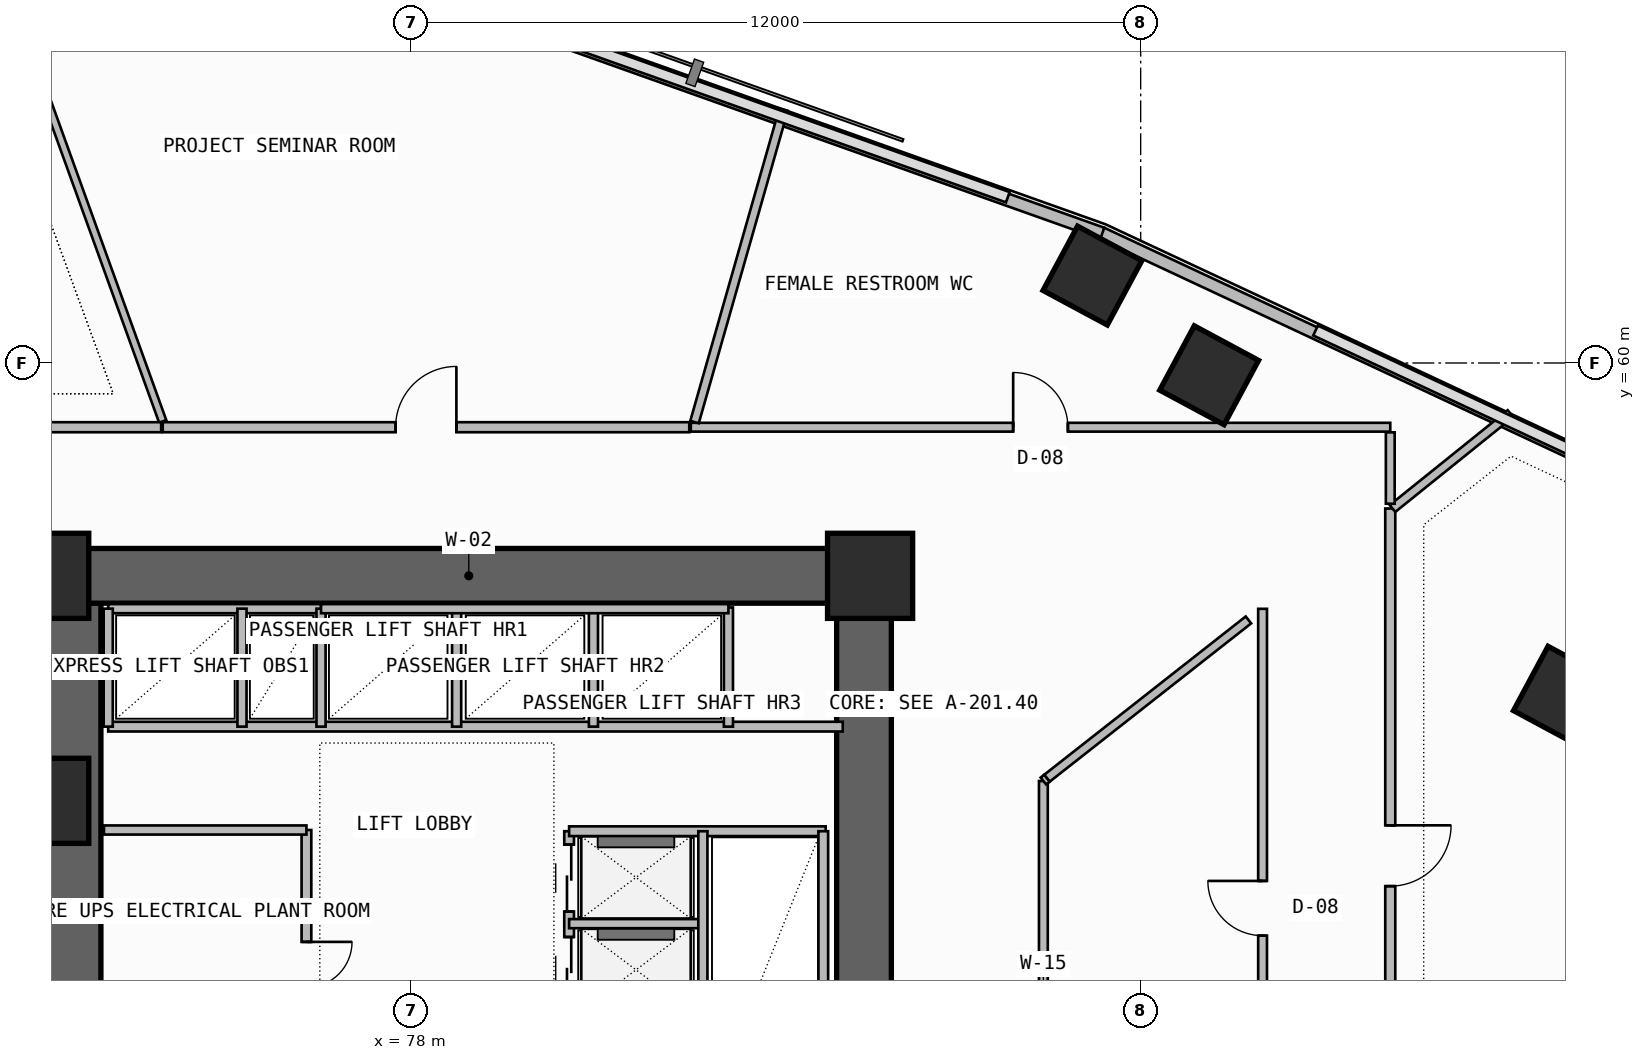
"""IFC4 building model, lengths in metres.
Left out: names, types, materials, properties, quantities, classifications, styles, units other than length and angle.
Written with IfcOpenShell. Run it as: python <this file> out.ifc"""

import sys

from ifc_helpers import new_model, si_unit, direction, frame, frame_2d, origin, origin_2d, place, context, subcontext, project, spatial, rectangle, extrude, element, fill, save


model = new_model("IFC4")
c1 = context("Model", 3, precision=1e-05, world=origin(), true_north=direction((0.0, 1.0)))
c2 = subcontext(c1, "Body", "Model", "MODEL_VIEW")
j1 = project(units=[si_unit("LENGTHUNIT", "METRE"), si_unit("PLANEANGLEUNIT", "RADIAN")], contexts=[c1])
p1 = place(None, origin())
s1 = spatial("IfcSite", under=j1, at=p1, CompositionType="ELEMENT")
p2 = place(p1, origin())
s2 = spatial("IfcBuilding", under=s1, at=p2, CompositionType="ELEMENT")
p3 = place(p2, frame((0.0, 0.0, 143.1)))
s3 = spatial("IfcBuildingStorey", under=s2, at=p3, CompositionType="ELEMENT", Elevation=143.1)
p4 = place(p3, frame((72.45, 43.35, -0.26), z_axis=(0.0, 0.0, 1.0), x_axis=(0.0, 1.0, 0.0)))
e1 = element("IfcWall", 1, at=p4, inside=s3, PredefinedType="SHEAR", context=c2, shape_type="SweptSolid", body=[
    extrude(rectangle(XDim=12.7, YDim=0.9, at=frame_2d((6.35, 0.0))), origin(), (0.0, 0.0, 1.0), 3.6),
])
p5 = place(p4, frame((1.35, 0.0, 0.26)))
e2 = element("IfcOpeningElement", 2, at=p5, cuts=e1, PredefinedType="OPENING", context=c2, shape_type="SweptSolid", body=[
    extrude(rectangle(XDim=1.2, YDim=2.2, at=frame_2d((0.6, 1.1))), frame((0.0, 0.46, 0.0), z_axis=(0.0, -1.0, 0.0), x_axis=(1.0, 0.0, 0.0)), (0.0, 0.0, 1.0), 0.92),
])
p6 = place(p3, frame((72.0, 56.5, -0.26), z_axis=(0.0, 0.0, 1.0), x_axis=(1.0, 0.0, 0.0)))
e3 = element("IfcWall", 3, at=p6, inside=s3, PredefinedType="SHEAR", context=c2, shape_type="SweptSolid", body=[
    extrude(rectangle(XDim=13.9, YDim=0.9, at=frame_2d((6.95, 0.0))), origin(), (0.0, 0.0, 1.0), 3.6),
])
p7 = place(p3, frame((85.45, 47.6, -0.26), z_axis=(0.0, 0.0, 1.0), x_axis=(0.0, 1.0, 0.0)))
e4 = element("IfcWall", 4, at=p7, inside=s3, PredefinedType="SHEAR", context=c2, shape_type="SweptSolid", body=[
    extrude(rectangle(XDim=8.45, YDim=0.9, at=frame_2d((4.225, 0.0))), origin(), (0.0, 0.0, 1.0), 3.6),
])
for number, where, z_axis, x_axis in (
    (5, (72.0, 52.8, 0.0), (0.0, 0.0, 1.0), (1.0, 0.0, 0.0)),
    (6, (72.0, 56.5, 0.0), (0.0, 0.0, 1.0), (1.0, 0.0, 0.0)),
    (7, (85.55, 56.5, 0.0), (0.0, 0.0, 1.0), (1.0, 0.0, 0.0)),
):
    element("IfcColumn", number, at=place(p3, frame(where, z_axis=z_axis, x_axis=x_axis)), inside=s3, PredefinedType="COLUMN", context=c2, shape_type="SweptSolid", body=[
        extrude(rectangle(XDim=1.4, YDim=1.4, at=origin_2d()), origin(), (0.0, 0.0, 1.0), 3.6),
    ])
for number, where, z_axis, x_axis in (
    (8, (96.944, 54.528, 0.0), (0.0, 0.0, 1.0), (0.473, 0.881, 0.0)),
    (9, (91.126, 59.798, 0.0), (0.0, 0.0, 1.0), (0.473, 0.881, 0.0)),
    (10, (89.207, 61.438, 0.0), (0.0, 0.0, 1.0), (0.473, 0.881, 0.0)),
):
    element("IfcColumn", number, at=place(p3, frame(where, z_axis=z_axis, x_axis=x_axis)), inside=s3, PredefinedType="COLUMN", context=c2, shape_type="SweptSolid", body=[
        extrude(rectangle(XDim=1.2, YDim=1.2, at=origin_2d()), origin(), (0.0, 0.0, 1.0), 3.6),
    ])
p8 = place(p3, frame((119.926, 47.843, 0.0), z_axis=(0.0, 0.0, 1.0), x_axis=(-0.905880730846, 0.423532881228, 0.0)))
e11 = element("IfcWall", 11, at=p8, inside=s3, PredefinedType="PARAPET", context=c2, shape_type="SweptSolid", body=[
    extrude(rectangle(XDim=33.748, YDim=0.2, at=frame_2d((16.874, 0.0))), origin(), (0.0, 0.0, 1.0), 1.15),
])
p9 = place(p3, frame((89.368, 62.13, 0.0), z_axis=(0.0, 0.0, 1.0), x_axis=(-0.942033439765, 0.335518998515, 0.0)))
e12 = element("IfcWall", 12, at=p9, inside=s3, PredefinedType="PARAPET", context=c2, shape_type="SweptSolid", body=[
    extrude(rectangle(XDim=27.969, YDim=0.2, at=frame_2d((13.985, 0.0))), origin(), (0.0, 0.0, 1.0), 1.15),
])
p10 = place(p3, frame((76.28, 47.18, 0.0), z_axis=(0.0, 0.0, 1.0), x_axis=(0.0, 1.0, 0.0)))
e13 = element("IfcWall", 13, at=p10, inside=s3, PredefinedType="SOLIDWALL", context=c2, shape_type="SweptSolid", body=[
    extrude(rectangle(XDim=5.14, YDim=0.16, at=frame_2d((2.57, 0.0))), origin(), (0.0, 0.0, 1.0), 3.34),
])
p11 = place(p10, frame((1.8, 0.0, 0.0)))
e14 = element("IfcOpeningElement", 14, at=p11, cuts=e13, PredefinedType="OPENING", context=c2, shape_type="SweptSolid", body=[
    extrude(rectangle(XDim=1.5, YDim=2.25, at=frame_2d((0.75, 1.125))), frame((0.0, 0.09, 0.0), z_axis=(0.0, -1.0, 0.0), x_axis=(1.0, 0.0, 0.0)), (0.0, 0.0, 1.0), 0.18),
])
p12 = place(p3, frame((72.95, 52.32, 0.0), z_axis=(0.0, 0.0, 1.0), x_axis=(1.0, 0.0, 0.0)))
e15 = element("IfcWall", 15, at=p12, inside=s3, PredefinedType="SOLIDWALL", context=c2, shape_type="SweptSolid", body=[
    extrude(rectangle(XDim=3.33, YDim=0.15, at=frame_2d((1.665, 0.0))), origin(), (0.0, 0.0, 1.0), 3.34),
])
p13 = place(p3, frame((80.6, 47.7, 0.0), z_axis=(0.0, 0.0, 1.0), x_axis=(0.0, 1.0, 0.0)))
e16 = element("IfcWall", 16, at=p13, inside=s3, PredefinedType="SOLIDWALL", context=c2, shape_type="SweptSolid", body=[
    extrude(rectangle(XDim=4.6, YDim=0.16, at=frame_2d((2.3, 0.0))), origin(), (0.0, 0.0, 1.0), 3.34),
])
p14 = place(p13, frame((0.24, 0.0, 0.0)))
e17 = element("IfcOpeningElement", 17, at=p14, cuts=e16, PredefinedType="OPENING", context=c2, shape_type="SweptSolid", body=[
    extrude(rectangle(XDim=1.1, YDim=2.25, at=frame_2d((0.55, 1.125))), frame((0.0, 0.09, 0.0), z_axis=(0.0, -1.0, 0.0), x_axis=(1.0, 0.0, 0.0)), (0.0, 0.0, 1.0), 0.18),
])
p15 = place(p13, frame((1.76, 0.0, 0.0)))
e18 = element("IfcOpeningElement", 18, at=p15, cuts=e16, PredefinedType="OPENING", context=c2, shape_type="SweptSolid", body=[
    extrude(rectangle(XDim=1.1, YDim=2.25, at=frame_2d((0.55, 1.125))), frame((0.0, 0.09, 0.0), z_axis=(0.0, -1.0, 0.0), x_axis=(1.0, 0.0, 0.0)), (0.0, 0.0, 1.0), 0.18),
])
p16 = place(p13, frame((3.28, 0.0, 0.0)))
e19 = element("IfcOpeningElement", 19, at=p16, cuts=e16, PredefinedType="OPENING", context=c2, shape_type="SweptSolid", body=[
    extrude(rectangle(XDim=1.1, YDim=2.25, at=frame_2d((0.55, 1.125))), frame((0.0, 0.09, 0.0), z_axis=(0.0, -1.0, 0.0), x_axis=(1.0, 0.0, 0.0)), (0.0, 0.0, 1.0), 0.18),
])
p17 = place(p3, frame((80.6, 52.3, 0.0), z_axis=(0.0, 0.0, 1.0), x_axis=(1.0, 0.0, 0.0)))
e20 = element("IfcWall", 20, at=p17, inside=s3, PredefinedType="SOLIDWALL", context=c2, shape_type="SweptSolid", body=[
    extrude(rectangle(XDim=4.22, YDim=0.16, at=frame_2d((2.11, 0.0))), origin(), (0.0, 0.0, 1.0), 3.34),
])
p18 = place(p3, frame((80.6, 50.78, 0.0), z_axis=(0.0, 0.0, 1.0), x_axis=(1.0, 0.0, 0.0)))
e21 = element("IfcWall", 21, at=p18, inside=s3, PredefinedType="PLUMBINGWALL", context=c2, shape_type="SweptSolid", body=[
    extrude(rectangle(XDim=2.2, YDim=0.15, at=frame_2d((1.1, 0.0))), origin(), (0.0, 0.0, 1.0), 3.34),
])
p19 = place(p3, frame((82.8, 47.7, 0.0), z_axis=(0.0, 0.0, 1.0), x_axis=(0.0, 1.0, 0.0)))
e22 = element("IfcWall", 22, at=p19, inside=s3, PredefinedType="PLUMBINGWALL", context=c2, shape_type="SweptSolid", body=[
    extrude(rectangle(XDim=4.6, YDim=0.15, at=frame_2d((2.3, 0.0))), origin(), (0.0, 0.0, 1.0), 3.34),
])
p20 = place(p3, frame((84.78, 47.7, 0.0), z_axis=(0.0, 0.0, 1.0), x_axis=(0.0, 1.0, 0.0)))
e23 = element("IfcWall", 23, at=p20, inside=s3, PredefinedType="SOLIDWALL", context=c2, shape_type="SweptSolid", body=[
    extrude(rectangle(XDim=4.6, YDim=0.16, at=frame_2d((2.3, 0.0))), origin(), (0.0, 0.0, 1.0), 3.34),
])
p21 = place(p3, frame((73.02, 54.02, 0.0), z_axis=(0.0, 0.0, 1.0), x_axis=(1.0, 0.0, 0.0)))
e24 = element("IfcWall", 24, at=p21, inside=s3, PredefinedType="SOLIDWALL", context=c2, shape_type="SweptSolid", body=[
    extrude(rectangle(XDim=12.08, YDim=0.16, at=frame_2d((6.04, 0.0))), origin(), (0.0, 0.0, 1.0), 3.34),
])
p22 = place(p3, frame((73.02, 55.96, 0.0), z_axis=(0.0, 0.0, 1.0), x_axis=(1.0, 0.0, 0.0)))
e25 = element("IfcWall", 25, at=p22, inside=s3, PredefinedType="SOLIDWALL", context=c2, shape_type="SweptSolid", body=[
    extrude(rectangle(XDim=3.5, YDim=0.15, at=frame_2d((1.75, 0.0))), origin(), (0.0, 0.0, 1.0), 3.34),
])
p23 = place(p3, frame((73.02, 54.02, 0.0), z_axis=(0.0, 0.0, 1.0), x_axis=(0.0, 1.0, 0.0)))
e26 = element("IfcWall", 26, at=p23, inside=s3, PredefinedType="PLUMBINGWALL", context=c2, shape_type="SweptSolid", body=[
    extrude(rectangle(XDim=1.94, YDim=0.15, at=frame_2d((0.97, 0.0))), origin(), (0.0, 0.0, 1.0), 3.34),
])
p24 = place(p3, frame((76.52, 54.02, 0.0), z_axis=(0.0, 0.0, 1.0), x_axis=(0.0, 1.0, 0.0)))
e27 = element("IfcWall", 27, at=p24, inside=s3, PredefinedType="SOLIDWALL", context=c2, shape_type="SweptSolid", body=[
    extrude(rectangle(XDim=1.94, YDim=0.15, at=frame_2d((0.97, 0.0))), origin(), (0.0, 0.0, 1.0), 3.34),
])
p25 = place(p3, frame((75.22, 54.02, 0.0), z_axis=(0.0, 0.0, 1.0), x_axis=(0.0, 1.0, 0.0)))
e28 = element("IfcWall", 28, at=p25, inside=s3, PredefinedType="PLUMBINGWALL", context=c2, shape_type="SweptSolid", body=[
    extrude(rectangle(XDim=1.94, YDim=0.15, at=frame_2d((0.97, 0.0))), origin(), (0.0, 0.0, 1.0), 3.34),
])
for number, where, z_axis, x_axis in (
    (29, (78.75, 54.02, 0.0), (0.0, 0.0, 1.0), (0.0, 1.0, 0.0)),
    (30, (81.0, 54.02, 0.0), (0.0, 0.0, 1.0), (0.0, 1.0, 0.0)),
):
    element("IfcWall", number, at=place(p3, frame(where, z_axis=z_axis, x_axis=x_axis)), inside=s3, PredefinedType="PLUMBINGWALL", context=c2, shape_type="SweptSolid", body=[
        extrude(rectangle(XDim=1.96, YDim=0.15, at=frame_2d((0.98, 0.0))), origin(), (0.0, 0.0, 1.0), 3.34),
    ])
p26 = place(p3, frame((83.22, 54.02, 0.0), z_axis=(0.0, 0.0, 1.0), x_axis=(0.0, 1.0, 0.0)))
e31 = element("IfcWall", 31, at=p26, inside=s3, PredefinedType="SOLIDWALL", context=c2, shape_type="SweptSolid", body=[
    extrude(rectangle(XDim=1.96, YDim=0.15, at=frame_2d((0.98, 0.0))), origin(), (0.0, 0.0, 1.0), 3.34),
])
p27 = place(p3, frame((76.52, 55.96, 0.0), z_axis=(0.0, 0.0, 1.0), x_axis=(1.0, 0.0, 0.0)))
e32 = element("IfcWall", 32, at=p27, inside=s3, PredefinedType="SOLIDWALL", context=c2, shape_type="SweptSolid", body=[
    extrude(rectangle(XDim=6.7, YDim=0.15, at=frame_2d((3.35, 0.0))), origin(), (0.0, 0.0, 1.0), 3.34),
])
p28 = place(p3, frame((94.105, 46.187, 0.0), z_axis=(0.0, 0.0, 1.0), x_axis=(0.0, 1.0, 0.0)))
e33 = element("IfcWall", 33, at=p28, inside=s3, PredefinedType="PARTITIONING", context=c2, shape_type="SweptSolid", body=[
    extrude(rectangle(XDim=11.42, YDim=0.165, at=frame_2d((5.71, 0.0))), origin(), (0.0, 0.0, 1.0), 2.725),
])
p29 = place(p28, frame((5.21, 0.0, 0.0)))
e34 = element("IfcOpeningElement", 34, at=p29, cuts=e33, PredefinedType="OPENING", context=c2, shape_type="SweptSolid", body=[
    extrude(rectangle(XDim=1.0, YDim=2.2, at=frame_2d((0.5, 1.1))), frame((0.0, 0.093, 0.0), z_axis=(0.0, -1.0, 0.0), x_axis=(1.0, 0.0, 0.0)), (0.0, 0.0, 1.0), 0.185),
])
p30 = place(p3, frame((94.142, 57.607, 0.0), z_axis=(0.0, 0.0, 1.0), x_axis=(0.77909579135, 0.626904895419, 0.0)))
e35 = element("IfcWall", 35, at=p30, inside=s3, PredefinedType="PARTITIONING", context=c2, shape_type="SweptSolid", body=[
    extrude(rectangle(XDim=2.49, YDim=0.145, at=frame_2d((1.245, 0.0))), origin(), (0.0, 0.0, 1.0), 3.34),
])
p31 = place(p3, frame((92.005, 55.958, 0.0), z_axis=(0.0, 0.0, 1.0), x_axis=(0.0, -1.0, 0.0)))
e36 = element("IfcWall", 36, at=p31, inside=s3, PredefinedType="PARTITIONING", context=c2, shape_type="SweptSolid", body=[
    extrude(rectangle(XDim=9.85, YDim=0.145, at=frame_2d((4.925, 0.0))), origin(), (0.0, 0.0, 1.0), 2.725),
])
p32 = place(p31, frame((4.475, 0.0, 0.0)))
e37 = element("IfcOpeningElement", 37, at=p32, cuts=e36, PredefinedType="OPENING", context=c2, shape_type="SweptSolid", body=[
    extrude(rectangle(XDim=0.9, YDim=2.1, at=frame_2d((0.45, 1.05))), frame((0.0, 0.083, 0.0), z_axis=(0.0, -1.0, 0.0), x_axis=(1.0, 0.0, 0.0)), (0.0, 0.0, 1.0), 0.165),
])
p33 = place(p3, frame((88.4, 45.972, 0.0), z_axis=(0.0, 0.0, 1.0), x_axis=(0.0, 1.0, 0.0)))
e38 = element("IfcWall", 38, at=p33, inside=s3, PredefinedType="PARTITIONING", context=c2, shape_type="SweptSolid", body=[
    extrude(rectangle(XDim=7.153, YDim=0.145, at=frame_2d((3.577, 0.0))), origin(), (0.0, 0.0, 1.0), 3.34),
])
p34 = place(p3, frame((88.4, 53.125, 0.0), z_axis=(0.0, 0.0, 1.0), x_axis=(0.785209472927, 0.619230234747, 0.0)))
e39 = element("IfcWall", 39, at=p34, inside=s3, PredefinedType="PARTITIONING", context=c2, shape_type="SweptSolid", body=[
    extrude(rectangle(XDim=0.076, YDim=0.145, at=frame_2d((0.038, 0.0))), origin(), (0.0, 0.0, 1.0), 3.34),
])
p35 = place(p3, frame((94.105, 58.944, 0.0), z_axis=(0.0, 0.0, 1.0), x_axis=(-1.0, 0.0, 0.0)))
e40 = element("IfcWall", 40, at=p35, inside=s3, PredefinedType="PARTITIONING", context=c2, shape_type="SweptSolid", body=[
    extrude(rectangle(XDim=11.504, YDim=0.145, at=frame_2d((5.752, 0.0))), origin(), (0.0, 0.0, 1.0), 2.725),
])
p36 = place(p35, frame((5.302, 0.0, 0.0)))
e41 = element("IfcOpeningElement", 41, at=p36, cuts=e40, PredefinedType="OPENING", context=c2, shape_type="SweptSolid", body=[
    extrude(rectangle(XDim=0.9, YDim=2.1, at=frame_2d((0.45, 1.05))), frame((0.0, 0.083, 0.0), z_axis=(0.0, -1.0, 0.0), x_axis=(1.0, 0.0, 0.0)), (0.0, 0.0, 1.0), 0.165),
])
p37 = place(p3, frame((94.105, 57.686, 0.0), z_axis=(0.0, 0.0, 1.0), x_axis=(0.0, 1.0, 0.0)))
e42 = element("IfcWall", 42, at=p37, inside=s3, PredefinedType="PARTITIONING", context=c2, shape_type="SweptSolid", body=[
    extrude(rectangle(XDim=1.174, YDim=0.145, at=frame_2d((0.587, 0.0))), origin(), (0.0, 0.0, 1.0), 3.34),
])
p38 = place(p3, frame((82.663, 59.029, 0.0), z_axis=(0.0, 0.0, 1.0), x_axis=(0.274027024553, 0.961721991957, 0.0)))
e43 = element("IfcWall", 43, at=p38, inside=s3, PredefinedType="PARTITIONING", context=c2, shape_type="SweptSolid", body=[
    extrude(rectangle(XDim=5.343, YDim=0.145, at=frame_2d((2.671, 0.0))), origin(), (0.0, 0.0, 1.0), 3.34),
])
p39 = place(p3, frame((82.576, 58.944, 0.0), z_axis=(0.0, 0.0, 1.0), x_axis=(-1.0, 0.0, 0.0)))
e44 = element("IfcWall", 44, at=p39, inside=s3, PredefinedType="PARTITIONING", context=c2, shape_type="SweptSolid", body=[
    extrude(rectangle(XDim=8.66, YDim=0.165, at=frame_2d((4.33, 0.0))), origin(), (0.0, 0.0, 1.0), 3.34),
])
p40 = place(p39, frame((3.83, 0.0, 0.0)))
e45 = element("IfcOpeningElement", 45, at=p40, cuts=e44, PredefinedType="OPENING", context=c2, shape_type="SweptSolid", body=[
    extrude(rectangle(XDim=1.0, YDim=2.2, at=frame_2d((0.5, 1.1))), frame((0.0, 0.093, 0.0), z_axis=(0.0, -1.0, 0.0), x_axis=(1.0, 0.0, 0.0)), (0.0, 0.0, 1.0), 0.185),
])
p41 = place(p3, frame((73.917, 59.039, 0.0), z_axis=(0.0, 0.0, 1.0), x_axis=(-0.33969494852, 0.940535667559, 0.0)))
e46 = element("IfcWall", 46, at=p41, inside=s3, PredefinedType="PARTITIONING", context=c2, shape_type="SweptSolid", body=[
    extrude(rectangle(XDim=10.695, YDim=0.125, at=frame_2d((5.348, 0.0))), origin(), (0.0, 0.0, 1.0), 3.34),
])
p42 = place(p3, frame((73.891, 58.944, 0.0), z_axis=(0.0, 0.0, 1.0), x_axis=(-1.0, 0.0, 0.0)))
e47 = element("IfcWall", 47, at=p42, inside=s3, PredefinedType="PARTITIONING", context=c2, shape_type="SweptSolid", body=[
    extrude(rectangle(XDim=4.451, YDim=0.165, at=frame_2d((2.226, 0.0))), origin(), (0.0, 0.0, 1.0), 2.725),
])
p43 = place(p3, frame((88.46, 53.173, 0.0), z_axis=(0.0, 0.0, 1.0), x_axis=(0.786390736742, 0.61772939801, 0.0)))
e48 = element("IfcWall", 48, at=p43, inside=s3, PredefinedType="PARTITIONING", context=c2, shape_type="SweptSolid", body=[
    extrude(rectangle(XDim=4.212, YDim=0.145, at=frame_2d((2.106, 0.0))), origin(), (0.0, 0.0, 1.0), 2.725),
])
p44 = place(p11, frame((1.5, 0.0, 0.0), z_axis=(0.0, 0.0, 1.0), x_axis=(-1.0, 0.0, 0.0)))
e49 = element("IfcDoor", 49, at=p44, inside=s3, OperationType="DOUBLE_DOOR_SINGLE_SWING", PredefinedType="DOOR", context=c2, shape_type="SweptSolid", body=[
    extrude(rectangle(XDim=1.5, YDim=2.25, at=frame_2d((0.75, 1.125))), frame((0.0, 0.025, 0.0), z_axis=(0.0, -1.0, 0.0), x_axis=(1.0, 0.0, 0.0)), (0.0, 0.0, 1.0), 0.05),
])
fill(e14, e49)
p45 = place(p15, frame((1.1, 0.0, 0.0), z_axis=(0.0, 0.0, 1.0), x_axis=(-1.0, 0.0, 0.0)))
e50 = element("IfcDoor", 50, at=p45, inside=s3, OperationType="DOUBLE_DOOR_SLIDING", PredefinedType="DOOR", context=c2, shape_type="SweptSolid", body=[
    extrude(rectangle(XDim=1.1, YDim=2.25, at=frame_2d((0.55, 1.125))), frame((0.0, 0.025, 0.0), z_axis=(0.0, -1.0, 0.0), x_axis=(1.0, 0.0, 0.0)), (0.0, 0.0, 1.0), 0.05),
])
fill(e18, e50)
p46 = place(p16, frame((1.1, 0.0, 0.0), z_axis=(0.0, 0.0, 1.0), x_axis=(-1.0, 0.0, 0.0)))
e51 = element("IfcDoor", 51, at=p46, inside=s3, OperationType="DOUBLE_DOOR_SLIDING", PredefinedType="DOOR", context=c2, shape_type="SweptSolid", body=[
    extrude(rectangle(XDim=1.1, YDim=2.25, at=frame_2d((0.55, 1.125))), frame((0.0, 0.025, 0.0), z_axis=(0.0, -1.0, 0.0), x_axis=(1.0, 0.0, 0.0)), (0.0, 0.0, 1.0), 0.05),
])
fill(e19, e51)
p47 = place(p29, frame((1.0, 0.0, 0.0), z_axis=(0.0, 0.0, 1.0), x_axis=(-1.0, 0.0, 0.0)))
e52 = element("IfcDoor", 52, at=p47, inside=s3, OperationType="SINGLE_SWING_LEFT", PredefinedType="DOOR", context=c2, shape_type="SweptSolid", body=[
    extrude(rectangle(XDim=1.0, YDim=2.2, at=frame_2d((0.5, 1.1))), frame((0.0, 0.025, 0.0), z_axis=(0.0, -1.0, 0.0), x_axis=(1.0, 0.0, 0.0)), (0.0, 0.0, 1.0), 0.05),
])
fill(e34, e52)
p48 = place(p32, frame((0.9, 0.0, 0.0), z_axis=(0.0, 0.0, 1.0), x_axis=(-1.0, 0.0, 0.0)))
e53 = element("IfcDoor", 53, at=p48, inside=s3, OperationType="SINGLE_SWING_RIGHT", PredefinedType="DOOR", context=c2, shape_type="SweptSolid", body=[
    extrude(rectangle(XDim=0.9, YDim=2.1, at=frame_2d((0.45, 1.05))), frame((0.0, 0.025, 0.0), z_axis=(0.0, -1.0, 0.0), x_axis=(1.0, 0.0, 0.0)), (0.0, 0.0, 1.0), 0.05),
])
fill(e37, e53)
p49 = place(p36, frame((0.9, 0.0, 0.0), z_axis=(0.0, 0.0, 1.0), x_axis=(-1.0, 0.0, 0.0)))
e54 = element("IfcDoor", 54, at=p49, inside=s3, OperationType="SINGLE_SWING_LEFT", PredefinedType="DOOR", context=c2, shape_type="SweptSolid", body=[
    extrude(rectangle(XDim=0.9, YDim=2.1, at=frame_2d((0.45, 1.05))), frame((0.0, 0.025, 0.0), z_axis=(0.0, -1.0, 0.0), x_axis=(1.0, 0.0, 0.0)), (0.0, 0.0, 1.0), 0.05),
])
fill(e41, e54)
p50 = place(p40, frame((1.0, 0.0, 0.0), z_axis=(0.0, 0.0, 1.0), x_axis=(-1.0, 0.0, 0.0)))
e55 = element("IfcDoor", 55, at=p50, inside=s3, OperationType="SINGLE_SWING_RIGHT", PredefinedType="DOOR", context=c2, shape_type="SweptSolid", body=[
    extrude(rectangle(XDim=1.0, YDim=2.2, at=frame_2d((0.5, 1.1))), frame((0.0, 0.025, 0.0), z_axis=(0.0, -1.0, 0.0), x_axis=(1.0, 0.0, 0.0)), (0.0, 0.0, 1.0), 0.05),
])
fill(e45, e55)
save(model, sys.argv[1])
